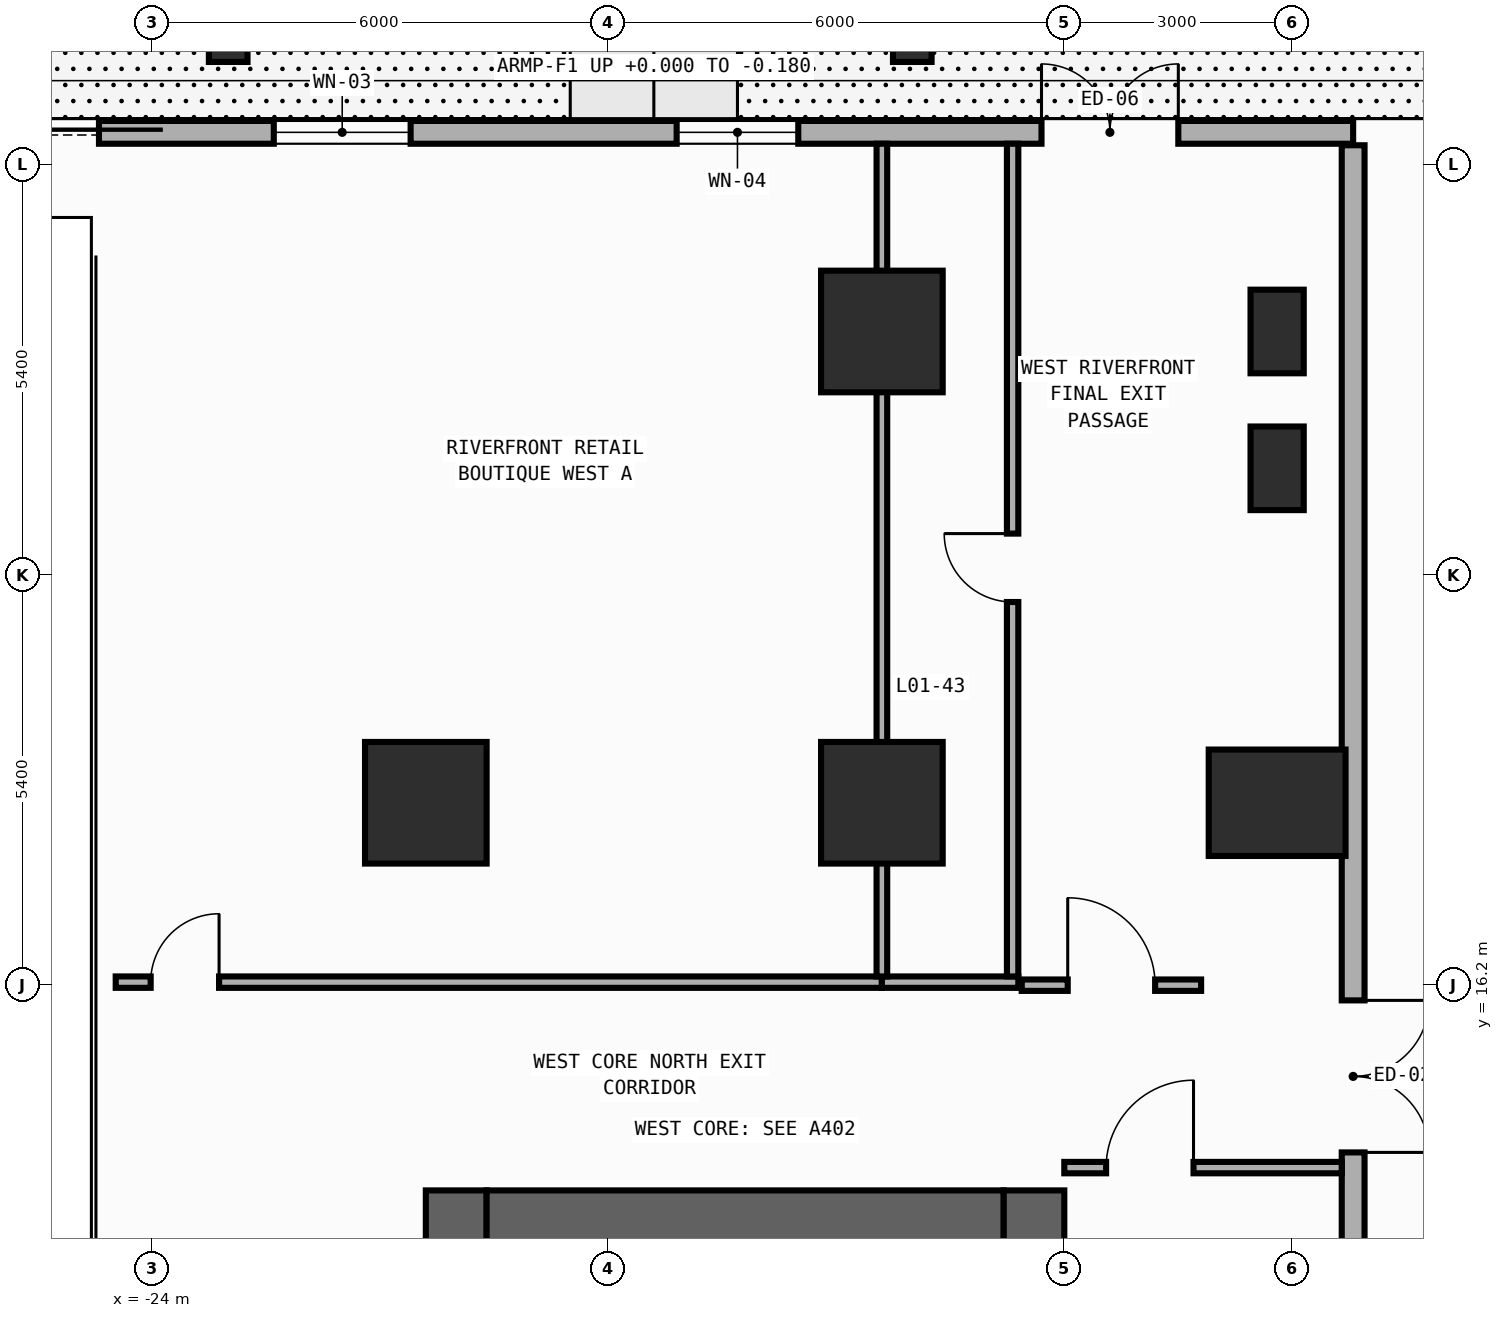
"""IFC4 building model, lengths in metres.
Left out: names, types, materials, properties, quantities, classifications, styles, units other than length and angle.
Written with IfcOpenShell. Run it as: python <this file> out.ifc"""

import sys

from ifc_helpers import new_model, si_unit, direction, frame, frame_2d, origin, origin_2d, place, context, subcontext, project, spatial, rectangle, hollow_circle, extrude, element, fill, save


model = new_model("IFC4")
c1 = context("Model", 3, precision=1e-05, world=origin(), true_north=direction((0.0, 1.0)))
c2 = subcontext(c1, "Body", "Model", "MODEL_VIEW")
j1 = project(units=[si_unit("LENGTHUNIT", "METRE"), si_unit("PLANEANGLEUNIT", "RADIAN")], contexts=[c1])
p1 = place(None, origin())
s1 = spatial("IfcSite", under=j1, at=p1, CompositionType="ELEMENT")
p2 = place(p1, origin())
s2 = spatial("IfcBuilding", under=s1, at=p2, CompositionType="ELEMENT")
p3 = place(p2, origin())
s3 = spatial("IfcBuildingStorey", under=s2, at=p3, CompositionType="ELEMENT", Elevation=0.0)
for number, where, z_axis, x_axis in (
    (1, (-23.0, 28.6, -0.2), (0.0, 0.0, 1.0), (1.0, 0.0, 0.0)),
    (2, (-14.0, 28.6, -0.2), (0.0, 0.0, 1.0), (1.0, 0.0, 0.0)),
):
    element("IfcColumn", number, at=place(p3, frame(where, z_axis=z_axis, x_axis=x_axis)), inside=s3, PredefinedType="COLUMN", context=c2, shape_type="SweptSolid", body=[
        extrude(hollow_circle(Radius=0.254, WallThickness=0.025, at=origin_2d()), origin(), (0.0, 0.0, 1.0), 5.6),
    ])
p4 = place(p3, frame((-20.0, -13.5, 0.0), z_axis=(0.0, 0.0, 1.0), x_axis=(0.0, 1.0, 0.0)))
e3 = element("IfcWall", 3, at=p4, inside=s3, PredefinedType="SHEAR", context=c2, shape_type="SweptSolid", body=[
    extrude(rectangle(XDim=27.0, YDim=0.8, at=frame_2d((13.5, 0.0))), origin(), (0.0, 0.0, 1.0), 5.7),
])
p5 = place(p3, frame((-12.4, -13.5, 0.0), z_axis=(0.0, 0.0, 1.0), x_axis=(0.0, 1.0, 0.0)))
e4 = element("IfcWall", 4, at=p5, inside=s3, PredefinedType="SHEAR", context=c2, shape_type="SweptSolid", body=[
    extrude(rectangle(XDim=27.0, YDim=0.8, at=frame_2d((13.5, 0.0))), origin(), (0.0, 0.0, 1.0), 5.7),
])
p6 = place(p5, frame((21.55, 0.0, 0.0)))
e5 = element("IfcOpeningElement", 5, at=p6, cuts=e4, PredefinedType="OPENING", context=c2, shape_type="SweptSolid", body=[
    extrude(rectangle(XDim=1.1, YDim=2.2, at=frame_2d((0.55, 1.1))), frame((0.0, 0.41, 0.0), z_axis=(0.0, -1.0, 0.0), x_axis=(1.0, 0.0, 0.0)), (0.0, 0.0, 1.0), 0.82),
])
p7 = place(p5, frame((18.35, 0.0, 0.0)))
e6 = element("IfcOpeningElement", 6, at=p7, cuts=e4, PredefinedType="OPENING", context=c2, shape_type="SweptSolid", body=[
    extrude(rectangle(XDim=1.1, YDim=2.2, at=frame_2d((0.55, 1.1))), frame((0.0, 0.41, 0.0), z_axis=(0.0, -1.0, 0.0), x_axis=(1.0, 0.0, 0.0)), (0.0, 0.0, 1.0), 0.82),
])
p8 = place(p5, frame((15.15, 0.0, 0.0)))
e7 = element("IfcOpeningElement", 7, at=p8, cuts=e4, PredefinedType="OPENING", context=c2, shape_type="SweptSolid", body=[
    extrude(rectangle(XDim=1.1, YDim=2.2, at=frame_2d((0.55, 1.1))), frame((0.0, 0.41, 0.0), z_axis=(0.0, -1.0, 0.0), x_axis=(1.0, 0.0, 0.0)), (0.0, 0.0, 1.0), 0.82),
])
p9 = place(p5, frame((10.35, 0.0, 0.0)))
e8 = element("IfcOpeningElement", 8, at=p9, cuts=e4, PredefinedType="OPENING", context=c2, shape_type="SweptSolid", body=[
    extrude(rectangle(XDim=1.1, YDim=2.2, at=frame_2d((0.55, 1.1))), frame((0.0, 0.41, 0.0), z_axis=(0.0, -1.0, 0.0), x_axis=(1.0, 0.0, 0.0)), (0.0, 0.0, 1.0), 0.82),
])
p10 = place(p5, frame((7.15, 0.0, 0.0)))
e9 = element("IfcOpeningElement", 9, at=p10, cuts=e4, PredefinedType="OPENING", context=c2, shape_type="SweptSolid", body=[
    extrude(rectangle(XDim=1.1, YDim=2.2, at=frame_2d((0.55, 1.1))), frame((0.0, 0.41, 0.0), z_axis=(0.0, -1.0, 0.0), x_axis=(1.0, 0.0, 0.0)), (0.0, 0.0, 1.0), 0.82),
])
p11 = place(p5, frame((3.95, 0.0, 0.0)))
e10 = element("IfcOpeningElement", 10, at=p11, cuts=e4, PredefinedType="OPENING", context=c2, shape_type="SweptSolid", body=[
    extrude(rectangle(XDim=1.1, YDim=2.2, at=frame_2d((0.55, 1.1))), frame((0.0, 0.41, 0.0), z_axis=(0.0, -1.0, 0.0), x_axis=(1.0, 0.0, 0.0)), (0.0, 0.0, 1.0), 0.82),
])
p12 = place(p5, frame((12.725, 0.0, 0.0)))
e11 = element("IfcOpeningElement", 11, at=p12, cuts=e4, PredefinedType="OPENING", context=c2, shape_type="SweptSolid", body=[
    extrude(rectangle(XDim=1.15, YDim=2.2, at=frame_2d((0.575, 1.1))), frame((0.0, 0.41, 0.0), z_axis=(0.0, -1.0, 0.0), x_axis=(1.0, 0.0, 0.0)), (0.0, 0.0, 1.0), 0.82),
])
p13 = place(p5, frame((1.625, 0.0, 0.0)))
e12 = element("IfcOpeningElement", 12, at=p13, cuts=e4, PredefinedType="OPENING", context=c2, shape_type="SweptSolid", body=[
    extrude(rectangle(XDim=0.85, YDim=2.1, at=frame_2d((0.425, 1.05))), frame((0.0, 0.41, 0.0), z_axis=(0.0, -1.0, 0.0), x_axis=(1.0, 0.0, 0.0)), (0.0, 0.0, 1.0), 0.82),
])
p14 = place(p3, frame((-19.6, 13.1, 0.0), z_axis=(0.0, 0.0, 1.0), x_axis=(1.0, 0.0, 0.0)))
e13 = element("IfcWall", 13, at=p14, inside=s3, PredefinedType="SHEAR", context=c2, shape_type="SweptSolid", body=[
    extrude(rectangle(XDim=6.8, YDim=0.8, at=frame_2d((3.4, 0.0))), origin(), (0.0, 0.0, 1.0), 5.7),
])
p15 = place(p3, frame((-9.2, 18.6, 0.0), z_axis=(0.0, 0.0, 1.0), x_axis=(1.0, 0.0, 0.0)))
e14 = element("IfcColumn", 14, at=p15, inside=s3, PredefinedType="COLUMN", context=c2, shape_type="SweptSolid", body=[
    extrude(rectangle(XDim=1.8, YDim=1.4, at=origin_2d()), origin(), (0.0, 0.0, 1.0), 6.0),
])
for number, where, z_axis, x_axis in (
    (15, (-20.4, 18.6, 0.0), (0.0, 0.0, 1.0), (1.0, 0.0, 0.0)),
    (16, (-14.4, 18.6, 0.0), (0.0, 0.0, 1.0), (1.0, 0.0, 0.0)),
):
    element("IfcColumn", number, at=place(p3, frame(where, z_axis=z_axis, x_axis=x_axis)), inside=s3, PredefinedType="COLUMN", context=c2, shape_type="SweptSolid", body=[
        extrude(rectangle(XDim=1.6, YDim=1.6, at=origin_2d()), origin(), (0.0, 0.0, 1.0), 6.0),
    ])
p16 = place(p3, frame((-9.2, 24.8, 0.0), z_axis=(0.0, 0.0, 1.0), x_axis=(1.0, 0.0, 0.0)))
e17 = element("IfcColumn", 17, at=p16, inside=s3, PredefinedType="PILASTER", context=c2, shape_type="SweptSolid", body=[
    extrude(rectangle(XDim=0.7, YDim=1.1, at=origin_2d()), origin(), (0.0, 0.0, 1.0), 6.0),
])
p17 = place(p3, frame((-14.4, 24.8, 0.0), z_axis=(0.0, 0.0, 1.0), x_axis=(1.0, 0.0, 0.0)))
e18 = element("IfcColumn", 18, at=p17, inside=s3, PredefinedType="COLUMN", context=c2, shape_type="SweptSolid", body=[
    extrude(rectangle(XDim=1.6, YDim=1.6, at=origin_2d()), origin(), (0.0, 0.0, 1.0), 6.0),
])
p18 = place(p3, frame((-9.2, 23.0, 0.0), z_axis=(0.0, 0.0, 1.0), x_axis=(1.0, 0.0, 0.0)))
e19 = element("IfcColumn", 19, at=p18, inside=s3, PredefinedType="PILASTER", context=c2, shape_type="SweptSolid", body=[
    extrude(rectangle(XDim=0.7, YDim=1.1, at=origin_2d()), origin(), (0.0, 0.0, 1.0), 6.0),
])
p19 = place(p3, frame((-34.6, 27.42, 0.0), z_axis=(0.0, 0.0, 1.0), x_axis=(1.0, 0.0, 0.0)))
e20 = element("IfcWall", 20, at=p19, inside=s3, PredefinedType="STANDARD", context=c2, shape_type="SweptSolid", body=[
    extrude(rectangle(XDim=26.4, YDim=0.3, at=frame_2d((13.2, 0.0))), origin(), (0.0, 0.0, 1.0), 5.7),
])
p20 = place(p19, frame((22.3, 0.0, 0.0)))
e21 = element("IfcOpeningElement", 21, at=p20, cuts=e20, PredefinedType="OPENING", context=c2, shape_type="SweptSolid", body=[
    extrude(rectangle(XDim=1.8, YDim=2.4, at=frame_2d((0.9, 1.2))), frame((0.0, 0.16, 0.0), z_axis=(0.0, -1.0, 0.0), x_axis=(1.0, 0.0, 0.0)), (0.0, 0.0, 1.0), 0.32),
])
p21 = place(p19, frame((5.7, 0.0, 0.0)))
e22 = element("IfcOpeningElement", 22, at=p21, cuts=e20, PredefinedType="OPENING", context=c2, shape_type="SweptSolid", body=[
    extrude(rectangle(XDim=4.2, YDim=3.4, at=frame_2d((2.1, 1.7))), frame((0.0, 0.16, 0.0), z_axis=(0.0, -1.0, 0.0), x_axis=(1.0, 0.0, 0.0)), (0.0, 0.0, 1.0), 0.32),
])
p22 = place(p19, frame((12.2, 0.0, 0.85)))
e23 = element("IfcOpeningElement", 23, at=p22, cuts=e20, PredefinedType="OPENING", context=c2, shape_type="SweptSolid", body=[
    extrude(rectangle(XDim=1.8, YDim=1.9, at=frame_2d((0.9, 0.95))), frame((0.0, 0.16, 0.0), z_axis=(0.0, -1.0, 0.0), x_axis=(1.0, 0.0, 0.0)), (0.0, 0.0, 1.0), 0.32),
])
p23 = place(p19, frame((17.5, 0.0, 0.85)))
e24 = element("IfcOpeningElement", 24, at=p23, cuts=e20, PredefinedType="OPENING", context=c2, shape_type="SweptSolid", body=[
    extrude(rectangle(XDim=1.6, YDim=1.85, at=frame_2d((0.8, 0.925))), frame((0.0, 0.16, 0.0), z_axis=(0.0, -1.0, 0.0), x_axis=(1.0, 0.0, 0.0)), (0.0, 0.0, 1.0), 0.32),
])
p24 = place(p3, frame((-8.2, 27.25, 0.0), z_axis=(0.0, 0.0, 1.0), x_axis=(0.0, -1.0, 0.0)))
e25 = element("IfcWall", 25, at=p24, inside=s3, PredefinedType="STANDARD", context=c2, shape_type="SweptSolid", body=[
    extrude(rectangle(XDim=54.5, YDim=0.3, at=frame_2d((27.25, 0.0))), origin(), (0.0, 0.0, 1.0), 5.7),
])
p25 = place(p24, frame((11.25, 0.0, 0.0)))
e26 = element("IfcOpeningElement", 26, at=p25, cuts=e25, PredefinedType="OPENING", context=c2, shape_type="SweptSolid", body=[
    extrude(rectangle(XDim=2.0, YDim=2.4, at=frame_2d((1.0, 1.2))), frame((0.0, 0.16, 0.0), z_axis=(0.0, -1.0, 0.0), x_axis=(1.0, 0.0, 0.0)), (0.0, 0.0, 1.0), 0.32),
])
p26 = place(p24, frame((20.0, 0.0, 0.85)))
e27 = element("IfcOpeningElement", 27, at=p26, cuts=e25, PredefinedType="OPENING", context=c2, shape_type="SweptSolid", body=[
    extrude(rectangle(XDim=1.5, YDim=1.8, at=frame_2d((0.75, 0.9))), frame((0.0, 0.16, 0.0), z_axis=(0.0, -1.0, 0.0), x_axis=(1.0, 0.0, 0.0)), (0.0, 0.0, 1.0), 0.32),
])
p27 = place(p24, frame((30.0, 0.0, 0.85)))
e28 = element("IfcOpeningElement", 28, at=p27, cuts=e25, PredefinedType="OPENING", context=c2, shape_type="SweptSolid", body=[
    extrude(rectangle(XDim=1.35, YDim=1.75, at=frame_2d((0.675, 0.875))), frame((0.0, 0.16, 0.0), z_axis=(0.0, -1.0, 0.0), x_axis=(1.0, 0.0, 0.0)), (0.0, 0.0, 1.0), 0.32),
])
p28 = place(p3, frame((-12.0, 13.8, 0.0), z_axis=(0.0, 0.0, 1.0), x_axis=(1.0, 0.0, 0.0)))
e29 = element("IfcWall", 29, at=p28, inside=s3, PredefinedType="PARTITIONING", context=c2, shape_type="SweptSolid", body=[
    extrude(rectangle(XDim=3.65, YDim=0.15, at=frame_2d((1.825, 0.0))), origin(), (0.0, 0.0, 1.0), 5.7),
])
p29 = place(p28, frame((0.55, 0.0, 0.0)))
e30 = element("IfcOpeningElement", 30, at=p29, cuts=e29, PredefinedType="OPENING", context=c2, shape_type="SweptSolid", body=[
    extrude(rectangle(XDim=1.15, YDim=2.2, at=frame_2d((0.575, 1.1))), frame((0.0, 0.085, 0.0), z_axis=(0.0, -1.0, 0.0), x_axis=(1.0, 0.0, 0.0)), (0.0, 0.0, 1.0), 0.17),
])
p30 = place(p3, frame((-12.56, 16.2, 0.0), z_axis=(0.0, 0.0, 1.0), x_axis=(1.0, 0.0, 0.0)))
e31 = element("IfcWall", 31, at=p30, inside=s3, PredefinedType="PARTITIONING", context=c2, shape_type="SweptSolid", body=[
    extrude(rectangle(XDim=2.36, YDim=0.15, at=frame_2d((1.18, 0.0))), origin(), (0.0, 0.0, 1.0), 5.7),
])
p31 = place(p30, frame((0.605, 0.0, 0.0)))
e32 = element("IfcOpeningElement", 32, at=p31, cuts=e31, PredefinedType="OPENING", context=c2, shape_type="SweptSolid", body=[
    extrude(rectangle(XDim=1.15, YDim=2.2, at=frame_2d((0.575, 1.1))), frame((0.0, 0.085, 0.0), z_axis=(0.0, -1.0, 0.0), x_axis=(1.0, 0.0, 0.0)), (0.0, 0.0, 1.0), 0.17),
])
p32 = place(p3, frame((-24.48, 16.24, 0.0), z_axis=(0.0, 0.0, 1.0), x_axis=(1.0, 0.0, 0.0)))
e33 = element("IfcWall", 33, at=p32, inside=s3, PredefinedType="PARTITIONING", context=c2, shape_type="SweptSolid", body=[
    extrude(rectangle(XDim=10.08, YDim=0.15, at=frame_2d((5.04, 0.0))), origin(), (0.0, 0.0, 1.0), 5.7),
])
p33 = place(p32, frame((0.46, 0.0, 0.0)))
e34 = element("IfcOpeningElement", 34, at=p33, cuts=e33, PredefinedType="OPENING", context=c2, shape_type="SweptSolid", body=[
    extrude(rectangle(XDim=0.9, YDim=2.15, at=frame_2d((0.45, 1.075))), frame((0.0, 0.085, 0.0), z_axis=(0.0, -1.0, 0.0), x_axis=(1.0, 0.0, 0.0)), (0.0, 0.0, 1.0), 0.17),
])
p34 = place(p3, frame((-14.4, 16.24, 0.0), z_axis=(0.0, 0.0, 1.0), x_axis=(1.0, 0.0, 0.0)))
e35 = element("IfcWall", 35, at=p34, inside=s3, PredefinedType="PARTITIONING", context=c2, shape_type="SweptSolid", body=[
    extrude(rectangle(XDim=1.795, YDim=0.15, at=frame_2d((0.897, 0.0))), origin(), (0.0, 0.0, 1.0), 5.7),
])
p35 = place(p3, frame((-12.68, 16.315, 0.0), z_axis=(0.0, 0.0, 1.0), x_axis=(0.0, 1.0, 0.0)))
e36 = element("IfcWall", 36, at=p35, inside=s3, PredefinedType="PARTITIONING", context=c2, shape_type="SweptSolid", body=[
    extrude(rectangle(XDim=10.955, YDim=0.15, at=frame_2d((5.478, 0.0))), origin(), (0.0, 0.0, 1.0), 5.7),
])
p36 = place(p35, frame((4.926, 0.0, 0.0)))
e37 = element("IfcOpeningElement", 37, at=p36, cuts=e36, PredefinedType="OPENING", context=c2, shape_type="SweptSolid", body=[
    extrude(rectangle(XDim=0.9, YDim=2.15, at=frame_2d((0.45, 1.075))), frame((0.0, 0.085, 0.0), z_axis=(0.0, -1.0, 0.0), x_axis=(1.0, 0.0, 0.0)), (0.0, 0.0, 1.0), 0.17),
])
p37 = place(p3, frame((-14.4, 16.315, 0.0), z_axis=(0.0, 0.0, 1.0), x_axis=(0.0, 1.0, 0.0)))
e38 = element("IfcWall", 38, at=p37, inside=s3, PredefinedType="PARTITIONING", context=c2, shape_type="SweptSolid", body=[
    extrude(rectangle(XDim=10.955, YDim=0.14, at=frame_2d((5.478, 0.0))), origin(), (0.0, 0.0, 1.0), 4.8),
])
p38 = place(p25, origin())
e39 = element("IfcDoor", 39, at=p38, inside=s3, OperationType="DOUBLE_DOOR_SINGLE_SWING", PredefinedType="DOOR", context=c2, shape_type="SweptSolid", body=[
    extrude(rectangle(XDim=2.0, YDim=2.4, at=frame_2d((1.0, 1.2))), frame((0.0, 0.025, 0.0), z_axis=(0.0, -1.0, 0.0), x_axis=(1.0, 0.0, 0.0)), (0.0, 0.0, 1.0), 0.05),
])
fill(e26, e39)
p39 = place(p20, origin())
e40 = element("IfcDoor", 40, at=p39, inside=s3, OperationType="DOUBLE_DOOR_SINGLE_SWING", PredefinedType="DOOR", context=c2, shape_type="SweptSolid", body=[
    extrude(rectangle(XDim=1.8, YDim=2.4, at=frame_2d((0.9, 1.2))), frame((0.0, 0.025, 0.0), z_axis=(0.0, -1.0, 0.0), x_axis=(1.0, 0.0, 0.0)), (0.0, 0.0, 1.0), 0.05),
])
fill(e21, e40)
p40 = place(p21, origin())
e41 = element("IfcDoor", 41, at=p40, inside=s3, OperationType="SLIDING_TO_LEFT", PredefinedType="GATE", context=c2, shape_type="SweptSolid", body=[
    extrude(rectangle(XDim=4.2, YDim=3.4, at=frame_2d((2.1, 1.7))), frame((0.0, 0.025, 0.0), z_axis=(0.0, -1.0, 0.0), x_axis=(1.0, 0.0, 0.0)), (0.0, 0.0, 1.0), 0.05),
])
fill(e22, e41)
p41 = place(p22, origin())
e42 = element("IfcWindow", 42, at=p41, inside=s3, PartitioningType="SINGLE_PANEL", PredefinedType="WINDOW", context=c2, shape_type="SweptSolid", body=[
    extrude(rectangle(XDim=1.8, YDim=1.9, at=frame_2d((0.9, 0.95))), frame((0.0, 0.03, 0.0), z_axis=(0.0, -1.0, 0.0), x_axis=(1.0, 0.0, 0.0)), (0.0, 0.0, 1.0), 0.06),
])
fill(e23, e42)
p42 = place(p23, origin())
e43 = element("IfcWindow", 43, at=p42, inside=s3, PartitioningType="SINGLE_PANEL", PredefinedType="WINDOW", context=c2, shape_type="SweptSolid", body=[
    extrude(rectangle(XDim=1.6, YDim=1.85, at=frame_2d((0.8, 0.925))), frame((0.0, 0.03, 0.0), z_axis=(0.0, -1.0, 0.0), x_axis=(1.0, 0.0, 0.0)), (0.0, 0.0, 1.0), 0.06),
])
fill(e24, e43)
p43 = place(p29, origin())
e44 = element("IfcDoor", 44, at=p43, inside=s3, OperationType="SINGLE_SWING_RIGHT", PredefinedType="DOOR", context=c2, shape_type="SweptSolid", body=[
    extrude(rectangle(XDim=1.15, YDim=2.2, at=frame_2d((0.575, 1.1))), frame((0.0, 0.025, 0.0), z_axis=(0.0, -1.0, 0.0), x_axis=(1.0, 0.0, 0.0)), (0.0, 0.0, 1.0), 0.05),
])
fill(e30, e44)
p44 = place(p31, origin())
e45 = element("IfcDoor", 45, at=p44, inside=s3, OperationType="SINGLE_SWING_LEFT", PredefinedType="DOOR", context=c2, shape_type="SweptSolid", body=[
    extrude(rectangle(XDim=1.15, YDim=2.2, at=frame_2d((0.575, 1.1))), frame((0.0, 0.025, 0.0), z_axis=(0.0, -1.0, 0.0), x_axis=(1.0, 0.0, 0.0)), (0.0, 0.0, 1.0), 0.05),
])
fill(e32, e45)
p45 = place(p33, origin())
e46 = element("IfcDoor", 46, at=p45, inside=s3, OperationType="SINGLE_SWING_RIGHT", PredefinedType="DOOR", context=c2, shape_type="SweptSolid", body=[
    extrude(rectangle(XDim=0.9, YDim=2.15, at=frame_2d((0.45, 1.075))), frame((0.0, 0.025, 0.0), z_axis=(0.0, -1.0, 0.0), x_axis=(1.0, 0.0, 0.0)), (0.0, 0.0, 1.0), 0.05),
])
fill(e34, e46)
p46 = place(p36, origin())
e47 = element("IfcDoor", 47, at=p46, inside=s3, OperationType="SINGLE_SWING_RIGHT", PredefinedType="DOOR", context=c2, shape_type="SweptSolid", body=[
    extrude(rectangle(XDim=0.9, YDim=2.15, at=frame_2d((0.45, 1.075))), frame((0.0, 0.025, 0.0), z_axis=(0.0, -1.0, 0.0), x_axis=(1.0, 0.0, 0.0)), (0.0, 0.0, 1.0), 0.05),
])
fill(e37, e47)
save(model, sys.argv[1])
